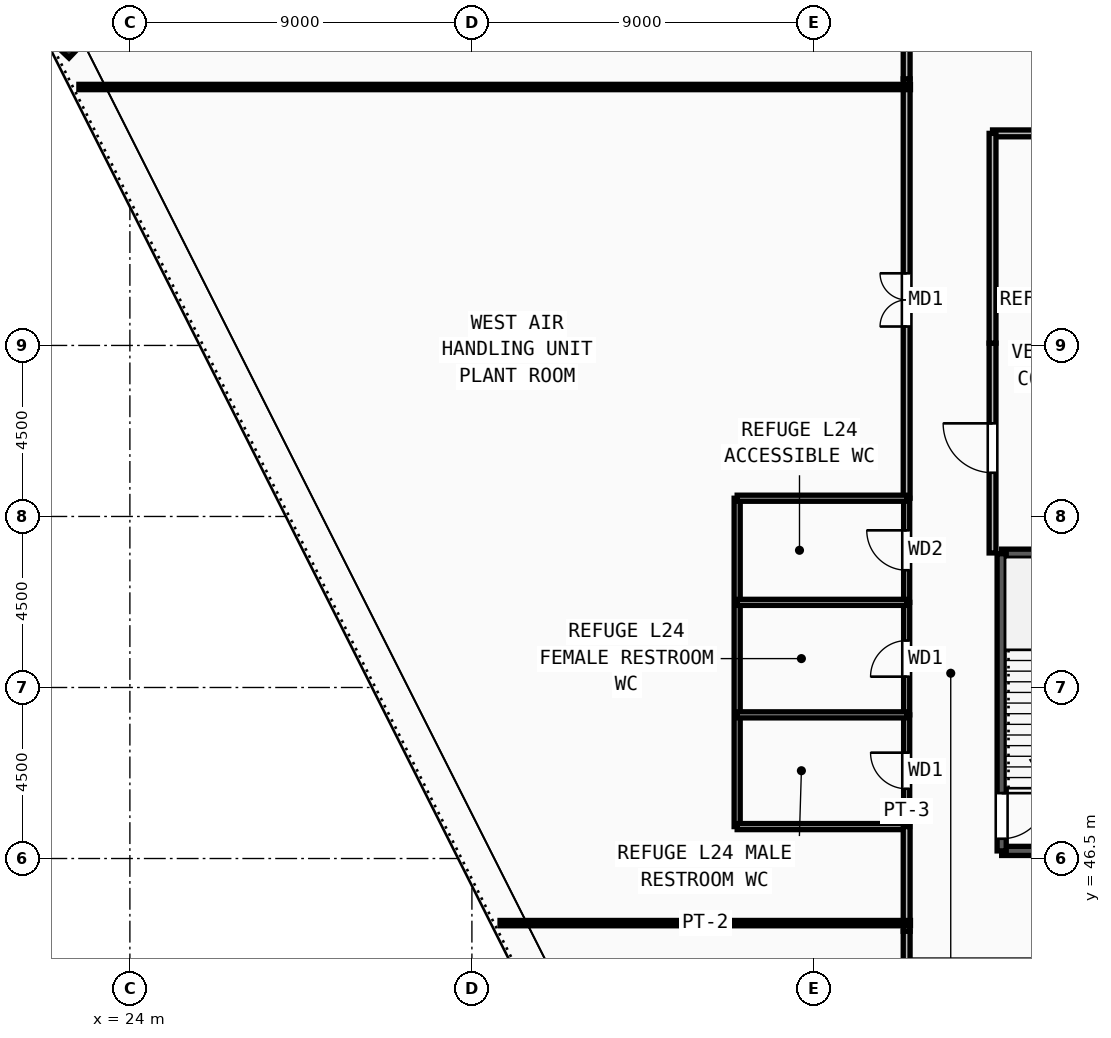
"""IFC4 building model, lengths in metres.
Left out: names, types, materials, properties, quantities, classifications, styles, units other than length and angle.
Written with IfcOpenShell. Run it as: python <this file> out.ifc"""

import sys

from ifc_helpers import new_model, si_unit, direction, frame, frame_2d, origin, origin_2d, place, context, subcontext, project, spatial, rectangle, extrude, source, transform, mapped, element, fill, save


model = new_model("IFC4")
c1 = context("Model", 3, precision=1e-05, world=origin(), true_north=direction((0.0, 1.0)))
c2 = subcontext(c1, "Body", "Model", "MODEL_VIEW")
j1 = project(units=[si_unit("LENGTHUNIT", "METRE"), si_unit("PLANEANGLEUNIT", "RADIAN")], contexts=[c1])
p1 = place(None, origin())
s1 = spatial("IfcSite", under=j1, at=p1, CompositionType="ELEMENT")
p2 = place(p1, origin())
s2 = spatial("IfcBuilding", under=s1, at=p2, CompositionType="ELEMENT")
p3 = place(p2, frame((0.0, 0.0, 93.0)))
s3 = spatial("IfcBuildingStorey", under=s2, at=p3, CompositionType="ELEMENT", Elevation=93.0)
m1 = source(origin(), c2, "Body", "SweptSolid", [
    extrude(rectangle(XDim=1.55, YDim=1.25, at=origin_2d()), origin(), (0.0, 0.0, 1.0), 4.5),
])
p4 = place(p3, frame((22.479, 68.555, 0.0), z_axis=(0.0, 0.0, 1.0), x_axis=(0.68936671806, 0.724412539946, 0.0)))
e1 = element("IfcColumn", 1, at=p4, inside=s3, PredefinedType="COLUMN", context=c2, shape_type="MappedRepresentation", body=[
    mapped(m1, transform((0.0, 0.0, 0.0), x_axis=(1.0, 0.0, 0.0), y_axis=(0.0, 1.0, 0.0), z_axis=(0.0, 0.0, 1.0), scale=1.0)),
])
for number, where, z_axis, x_axis in (
    (2, (46.94, 46.7, 0.0), (0.0, 0.0, 1.0), (1.0, 0.0, 0.0)),
    (3, (50.38, 54.52, 0.0), (0.0, 0.0, 1.0), (-1.0, 0.0, 0.0)),
):
    element("IfcWall", number, at=place(p3, frame(where, z_axis=z_axis, x_axis=x_axis)), inside=s3, PredefinedType="SOLIDWALL", context=c2, shape_type="SweptSolid", body=[
        extrude(rectangle(XDim=3.44, YDim=0.24, at=frame_2d((1.72, 0.0))), origin(), (0.0, 0.0, 1.0), 4.22),
    ])
p5 = place(p3, frame((46.94, 54.52, 0.0), z_axis=(0.0, 0.0, 1.0), x_axis=(0.0, -1.0, 0.0)))
e4 = element("IfcWall", 4, at=p5, inside=s3, PredefinedType="SOLIDWALL", context=c2, shape_type="SweptSolid", body=[
    extrude(rectangle(XDim=7.82, YDim=0.24, at=frame_2d((3.91, 0.0))), origin(), (0.0, 0.0, 1.0), 4.22),
])
m2 = source(origin(), c2, "Body", "SweptSolid", [
    extrude(rectangle(XDim=1.2, YDim=2.2, at=frame_2d((0.6, 1.1))), frame((0.0, 0.13, 0.0), z_axis=(0.0, -1.0, 0.0), x_axis=(1.0, 0.0, 0.0)), (0.0, 0.0, 1.0), 0.26),
])
p6 = place(p5, frame((6.3, 0.0, 0.0)))
e5 = element("IfcOpeningElement", 5, at=p6, cuts=e4, PredefinedType="OPENING", context=c2, shape_type="MappedRepresentation", body=[
    mapped(m2, transform((0.0, 0.0, 0.0), x_axis=(1.0, 0.0, 0.0), y_axis=(0.0, 1.0, 0.0), z_axis=(0.0, 0.0, 1.0), scale=1.0)),
])
p7 = place(p3, frame((44.44, 47.34, 0.0), z_axis=(0.0, 0.0, 1.0), x_axis=(0.0, 1.0, 0.0)))
e6 = element("IfcWall", 6, at=p7, inside=s3, PredefinedType="PARTITIONING", context=c2, shape_type="SweptSolid", body=[
    extrude(rectangle(XDim=2.94, YDim=0.16, at=frame_2d((1.47, 0.0))), origin(), (0.0, 0.0, 1.0), 4.22),
])
m3 = source(origin(), c2, "Body", "SweptSolid", [
    extrude(rectangle(XDim=0.95, YDim=2.15, at=frame_2d((0.475, 1.075))), frame((0.0, 0.09, 0.0), z_axis=(0.0, -1.0, 0.0), x_axis=(1.0, 0.0, 0.0)), (0.0, 0.0, 1.0), 0.18),
])
p8 = place(p7, frame((0.995, 0.0, 0.0)))
e7 = element("IfcOpeningElement", 7, at=p8, cuts=e6, PredefinedType="OPENING", context=c2, shape_type="MappedRepresentation", body=[
    mapped(m3, transform((0.0, 0.0, 0.0), x_axis=(1.0, 0.0, 0.0), y_axis=(0.0, 1.0, 0.0), z_axis=(0.0, 0.0, 1.0), scale=1.0)),
])
p9 = place(p3, frame((44.44, 50.28, 0.0), z_axis=(0.0, 0.0, 1.0), x_axis=(0.0, 1.0, 0.0)))
e8 = element("IfcWall", 8, at=p9, inside=s3, PredefinedType="PARTITIONING", context=c2, shape_type="SweptSolid", body=[
    extrude(rectangle(XDim=2.96, YDim=0.16, at=frame_2d((1.48, 0.0))), origin(), (0.0, 0.0, 1.0), 4.22),
])
p10 = place(p9, frame((1.005, 0.0, 0.0)))
e9 = element("IfcOpeningElement", 9, at=p10, cuts=e8, PredefinedType="OPENING", context=c2, shape_type="MappedRepresentation", body=[
    mapped(m3, transform((0.0, 0.0, 0.0), x_axis=(1.0, 0.0, 0.0), y_axis=(0.0, 1.0, 0.0), z_axis=(0.0, 0.0, 1.0), scale=1.0)),
])
p11 = place(p3, frame((44.44, 53.24, 0.0), z_axis=(0.0, 0.0, 1.0), x_axis=(0.0, 1.0, 0.0)))
e10 = element("IfcWall", 10, at=p11, inside=s3, PredefinedType="PARTITIONING", context=c2, shape_type="SweptSolid", body=[
    extrude(rectangle(XDim=2.74, YDim=0.16, at=frame_2d((1.37, 0.0))), origin(), (0.0, 0.0, 1.0), 4.22),
])
m4 = source(origin(), c2, "Body", "SweptSolid", [
    extrude(rectangle(XDim=1.05, YDim=2.15, at=frame_2d((0.525, 1.075))), frame((0.0, 0.09, 0.0), z_axis=(0.0, -1.0, 0.0), x_axis=(1.0, 0.0, 0.0)), (0.0, 0.0, 1.0), 0.18),
])
p12 = place(p11, frame((0.845, 0.0, 0.0)))
e11 = element("IfcOpeningElement", 11, at=p12, cuts=e10, PredefinedType="OPENING", context=c2, shape_type="MappedRepresentation", body=[
    mapped(m4, transform((0.0, 0.0, 0.0), x_axis=(1.0, 0.0, 0.0), y_axis=(0.0, 1.0, 0.0), z_axis=(0.0, 0.0, 1.0), scale=1.0)),
])
p13 = place(p3, frame((46.7, 54.54, 0.0), z_axis=(0.0, 0.0, 1.0), x_axis=(0.0, 1.0, 0.0)))
e12 = element("IfcWall", 12, at=p13, inside=s3, PredefinedType="PARTITIONING", context=c2, shape_type="SweptSolid", body=[
    extrude(rectangle(XDim=5.52, YDim=0.18, at=frame_2d((2.76, 0.0))), origin(), (0.0, 0.0, 1.0), 4.22),
])
m5 = source(origin(), c2, "Body", "SweptSolid", [
    extrude(rectangle(XDim=1.3, YDim=2.2, at=frame_2d((0.65, 1.1))), frame((0.0, 0.1, 0.0), z_axis=(0.0, -1.0, 0.0), x_axis=(1.0, 0.0, 0.0)), (0.0, 0.0, 1.0), 0.2),
])
p14 = place(p13, frame((2.11, 0.0, 0.0)))
e13 = element("IfcOpeningElement", 13, at=p14, cuts=e12, PredefinedType="OPENING", context=c2, shape_type="MappedRepresentation", body=[
    mapped(m5, transform((0.0, 0.0, 0.0), x_axis=(1.0, 0.0, 0.0), y_axis=(0.0, 1.0, 0.0), z_axis=(0.0, 0.0, 1.0), scale=1.0)),
])
p15 = place(p3, frame((44.44, 55.98, 0.0), z_axis=(0.0, 0.0, 1.0), x_axis=(0.0, 1.0, 0.0)))
e14 = element("IfcWall", 14, at=p15, inside=s3, PredefinedType="PARTITIONING", context=c2, shape_type="SweptSolid", body=[
    extrude(rectangle(XDim=11.035, YDim=0.18, at=frame_2d((5.518, 0.0))), origin(), (0.0, 0.0, 1.0), 4.22),
])
m6 = source(origin(), c2, "Body", "SweptSolid", [
    extrude(rectangle(XDim=1.4, YDim=2.25, at=frame_2d((0.7, 1.125))), frame((0.0, 0.1, 0.0), z_axis=(0.0, -1.0, 0.0), x_axis=(1.0, 0.0, 0.0)), (0.0, 0.0, 1.0), 0.2),
])
p16 = place(p15, frame((4.518, 0.0, 0.0)))
e15 = element("IfcOpeningElement", 15, at=p16, cuts=e14, PredefinedType="OPENING", context=c2, shape_type="MappedRepresentation", body=[
    mapped(m6, transform((0.0, 0.0, 0.0), x_axis=(1.0, 0.0, 0.0), y_axis=(0.0, 1.0, 0.0), z_axis=(0.0, 0.0, 1.0), scale=1.0)),
])
p17 = place(p3, frame((39.98, 47.34, 0.0), z_axis=(0.0, 0.0, 1.0), x_axis=(0.0, 1.0, 0.0)))
e16 = element("IfcWall", 16, at=p17, inside=s3, PredefinedType="PARTITIONING", context=c2, shape_type="SweptSolid", body=[
    extrude(rectangle(XDim=8.64, YDim=0.16, at=frame_2d((4.32, 0.0))), origin(), (0.0, 0.0, 1.0), 4.22),
])
for number, where, z_axis, x_axis in (
    (17, (39.98, 47.34, 0.0), (0.0, 0.0, 1.0), (1.0, 0.0, 0.0)),
    (18, (39.98, 50.28, 0.0), (0.0, 0.0, 1.0), (1.0, 0.0, 0.0)),
    (19, (39.98, 53.24, 0.0), (0.0, 0.0, 1.0), (1.0, 0.0, 0.0)),
    (20, (39.98, 55.98, 0.0), (0.0, 0.0, 1.0), (1.0, 0.0, 0.0)),
):
    element("IfcWall", number, at=place(p3, frame(where, z_axis=z_axis, x_axis=x_axis)), inside=s3, PredefinedType="PARTITIONING", context=c2, shape_type="SweptSolid", body=[
        extrude(rectangle(XDim=4.46, YDim=0.16, at=frame_2d((2.23, 0.0))), origin(), (0.0, 0.0, 1.0), 4.22),
    ])
p18 = place(p3, frame((46.7, 65.58, 0.0), z_axis=(0.0, 0.0, 1.0), x_axis=(1.0, 0.0, 0.0)))
e21 = element("IfcWall", 21, at=p18, inside=s3, PredefinedType="PARTITIONING", context=c2, shape_type="SweptSolid", body=[
    extrude(rectangle(XDim=3.84, YDim=0.18, at=frame_2d((1.92, 0.0))), origin(), (0.0, 0.0, 1.0), 4.22),
])
p19 = place(p3, frame((46.7, 60.06, 0.0), z_axis=(0.0, 0.0, 1.0), x_axis=(0.0, 1.0, 0.0)))
e22 = element("IfcWall", 22, at=p19, inside=s3, PredefinedType="PARTITIONING", context=c2, shape_type="SweptSolid", body=[
    extrude(rectangle(XDim=5.52, YDim=0.18, at=frame_2d((2.76, 0.0))), origin(), (0.0, 0.0, 1.0), 4.22),
])
p20 = place(p3, frame((44.44, 67.015, 0.0), z_axis=(0.0, 0.0, 1.0), x_axis=(0.0, 1.0, 0.0)))
e23 = element("IfcWall", 23, at=p20, inside=s3, PredefinedType="PARTITIONING", context=c2, shape_type="SweptSolid", body=[
    extrude(rectangle(XDim=0.965, YDim=0.18, at=frame_2d((0.482, 0.0))), origin(), (0.0, 0.0, 1.0), 4.22),
])
p21 = place(p3, frame((44.44, 44.585, 0.0), z_axis=(0.0, 0.0, 1.0), x_axis=(0.0, 1.0, 0.0)))
e24 = element("IfcWall", 24, at=p21, inside=s3, PredefinedType="PARTITIONING", context=c2, shape_type="SweptSolid", body=[
    extrude(rectangle(XDim=2.755, YDim=0.18, at=frame_2d((1.377, 0.0))), origin(), (0.0, 0.0, 1.0), 4.22),
])
p22 = place(p3, frame((44.44, 43.67, 0.0), z_axis=(0.0, 0.0, 1.0), x_axis=(0.0, 1.0, 0.0)))
e25 = element("IfcWall", 25, at=p22, inside=s3, PredefinedType="PARTITIONING", context=c2, shape_type="SweptSolid", body=[
    extrude(rectangle(XDim=0.915, YDim=0.18, at=frame_2d((0.458, 0.0))), origin(), (0.0, 0.0, 1.0), 4.22),
])
p23 = place(p3, frame((44.54, 44.8, 0.0), z_axis=(0.0, 0.0, 1.0), x_axis=(-1.0, 0.0, 0.0)))
e26 = element("IfcWall", 26, at=p23, inside=s3, PredefinedType="PARTITIONING", context=c2, shape_type="SweptSolid", body=[
    extrude(rectangle(XDim=10.8, YDim=0.14, at=frame_2d((5.4, 0.0))), origin(), (0.0, 0.0, 1.0), 4.22),
])
p24 = place(p3, frame((44.54, 66.8, 0.0), z_axis=(0.0, 0.0, 1.0), x_axis=(-1.0, 0.0, 0.0)))
e27 = element("IfcWall", 27, at=p24, inside=s3, PredefinedType="PARTITIONING", context=c2, shape_type="SweptSolid", body=[
    extrude(rectangle(XDim=21.882, YDim=0.14, at=frame_2d((10.941, 0.0))), origin(), (0.0, 0.0, 1.0), 3.305),
])
m7 = source(origin(), c2, "Body", "SweptSolid", [
    extrude(rectangle(XDim=1.2, YDim=2.2, at=frame_2d((0.6, 1.1))), frame((0.0, 0.025, 0.0), z_axis=(0.0, -1.0, 0.0), x_axis=(1.0, 0.0, 0.0)), (0.0, 0.0, 1.0), 0.05),
])
p25 = place(p6, origin())
e28 = element("IfcDoor", 28, at=p25, inside=s3, OperationType="SINGLE_SWING_LEFT", PredefinedType="DOOR", context=c2, shape_type="MappedRepresentation", body=[
    mapped(m7, transform((0.0, 0.0, 0.0), x_axis=(1.0, 0.0, 0.0), y_axis=(0.0, 1.0, 0.0), z_axis=(0.0, 0.0, 1.0), scale=1.0)),
])
fill(e5, e28)
m8 = source(origin(), c2, "Body", "SweptSolid", [
    extrude(rectangle(XDim=0.95, YDim=2.15, at=frame_2d((0.475, 1.075))), frame((0.0, 0.025, 0.0), z_axis=(0.0, -1.0, 0.0), x_axis=(1.0, 0.0, 0.0)), (0.0, 0.0, 1.0), 0.05),
])
p26 = place(p8, origin())
e29 = element("IfcDoor", 29, at=p26, inside=s3, OperationType="SINGLE_SWING_RIGHT", PredefinedType="DOOR", context=c2, shape_type="MappedRepresentation", body=[
    mapped(m8, transform((0.0, 0.0, 0.0), x_axis=(1.0, 0.0, 0.0), y_axis=(0.0, 1.0, 0.0), z_axis=(0.0, 0.0, 1.0), scale=1.0)),
])
fill(e7, e29)
p27 = place(p10, origin())
e30 = element("IfcDoor", 30, at=p27, inside=s3, OperationType="SINGLE_SWING_LEFT", PredefinedType="DOOR", context=c2, shape_type="MappedRepresentation", body=[
    mapped(m8, transform((0.0, 0.0, 0.0), x_axis=(1.0, 0.0, 0.0), y_axis=(0.0, 1.0, 0.0), z_axis=(0.0, 0.0, 1.0), scale=1.0)),
])
fill(e9, e30)
m9 = source(origin(), c2, "Body", "SweptSolid", [
    extrude(rectangle(XDim=1.05, YDim=2.15, at=frame_2d((0.525, 1.075))), frame((0.0, 0.025, 0.0), z_axis=(0.0, -1.0, 0.0), x_axis=(1.0, 0.0, 0.0)), (0.0, 0.0, 1.0), 0.05),
])
p28 = place(p12, origin())
e31 = element("IfcDoor", 31, at=p28, inside=s3, OperationType="SINGLE_SWING_RIGHT", PredefinedType="DOOR", context=c2, shape_type="MappedRepresentation", body=[
    mapped(m9, transform((0.0, 0.0, 0.0), x_axis=(1.0, 0.0, 0.0), y_axis=(0.0, 1.0, 0.0), z_axis=(0.0, 0.0, 1.0), scale=1.0)),
])
fill(e11, e31)
m10 = source(origin(), c2, "Body", "SweptSolid", [
    extrude(rectangle(XDim=1.3, YDim=2.2, at=frame_2d((0.65, 1.1))), frame((0.0, 0.025, 0.0), z_axis=(0.0, -1.0, 0.0), x_axis=(1.0, 0.0, 0.0)), (0.0, 0.0, 1.0), 0.05),
])
p29 = place(p14, origin())
e32 = element("IfcDoor", 32, at=p29, inside=s3, OperationType="SINGLE_SWING_RIGHT", PredefinedType="DOOR", context=c2, shape_type="MappedRepresentation", body=[
    mapped(m10, transform((0.0, 0.0, 0.0), x_axis=(1.0, 0.0, 0.0), y_axis=(0.0, 1.0, 0.0), z_axis=(0.0, 0.0, 1.0), scale=1.0)),
])
fill(e13, e32)
m11 = source(origin(), c2, "Body", "SweptSolid", [
    extrude(rectangle(XDim=1.4, YDim=2.25, at=frame_2d((0.7, 1.125))), frame((0.0, 0.025, 0.0), z_axis=(0.0, -1.0, 0.0), x_axis=(1.0, 0.0, 0.0)), (0.0, 0.0, 1.0), 0.05),
])
p30 = place(p16, origin())
e33 = element("IfcDoor", 33, at=p30, inside=s3, OperationType="DOUBLE_DOOR_SINGLE_SWING", PredefinedType="DOOR", context=c2, shape_type="MappedRepresentation", body=[
    mapped(m11, transform((0.0, 0.0, 0.0), x_axis=(1.0, 0.0, 0.0), y_axis=(0.0, 1.0, 0.0), z_axis=(0.0, 0.0, 1.0), scale=1.0)),
])
fill(e15, e33)
save(model, sys.argv[1])
